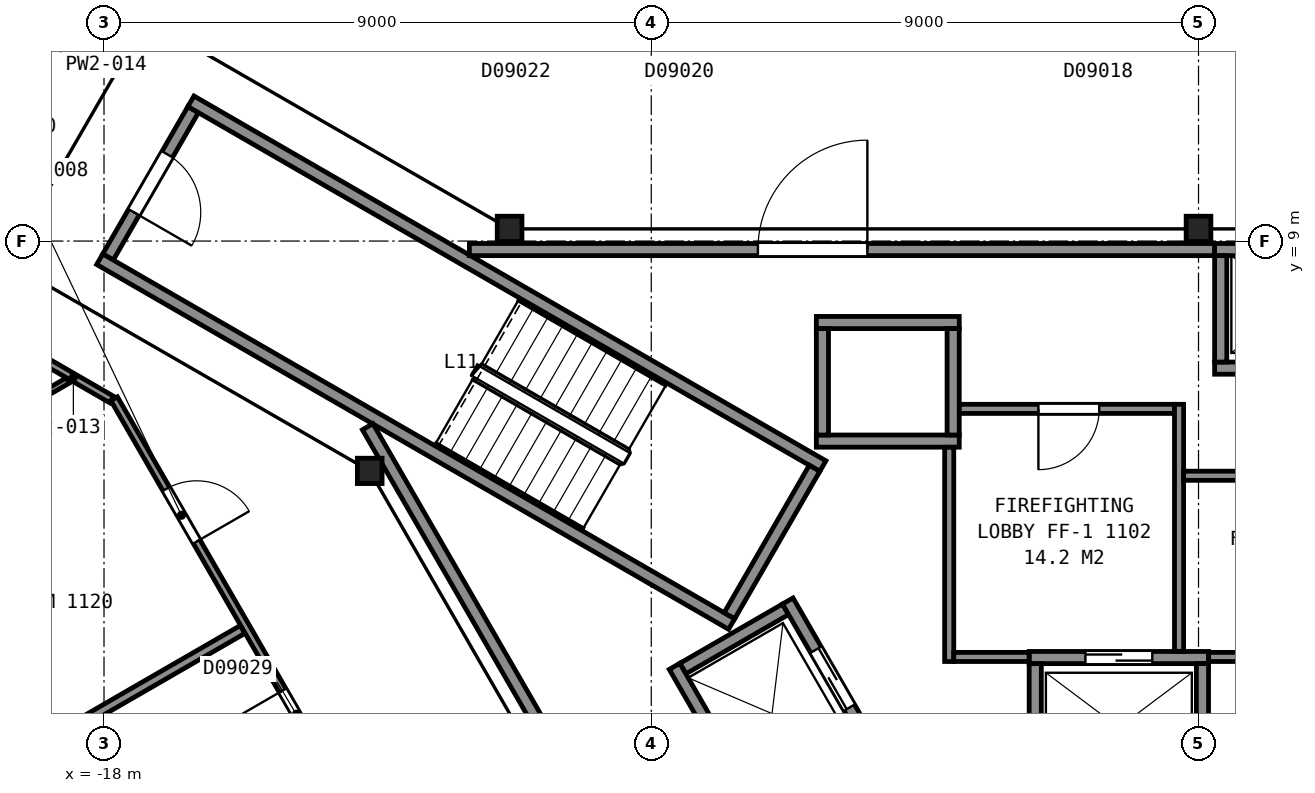
"""IFC4 building model, lengths in metres.
Left out: names, types, materials, properties, quantities, classifications, styles, units other than length and angle.
Written with IfcOpenShell. Run it as: python <this file> out.ifc"""

import sys

from ifc_helpers import new_model, si_unit, direction, frame, frame_2d, origin, origin_2d, place, context, subcontext, project, spatial, rectangle, i_section, extrude, element, fill, save


model = new_model("IFC4")
c1 = context("Model", 3, precision=1e-05, world=origin(), true_north=direction((0.0, 1.0)))
c2 = subcontext(c1, "Body", "Model", "MODEL_VIEW")
j1 = project(units=[si_unit("LENGTHUNIT", "METRE"), si_unit("PLANEANGLEUNIT", "RADIAN")], contexts=[c1])
p1 = place(None, origin())
s1 = spatial("IfcSite", under=j1, at=p1, CompositionType="ELEMENT")
p2 = place(p1, origin())
s2 = spatial("IfcBuilding", under=s1, at=p2, CompositionType="ELEMENT")
p3 = place(p2, frame((0.0, 0.0, 54.8)))
s3 = spatial("IfcBuildingStorey", under=s2, at=p3, CompositionType="ELEMENT", Elevation=54.8)
for number, where, z_axis, x_axis in (
    (1, (0.0, 9.2, 0.0), (0.0, 0.0, 1.0), (1.0, 0.0, 0.0)),
    (2, (-11.33, 9.2, 0.0), (0.0, 0.0, 1.0), (1.0, 0.0, 0.0)),
    (3, (-13.63, 5.22, 0.0), (0.0, 0.0, 1.0), (1.0, 0.0, 0.0)),
):
    element("IfcColumn", number, at=place(p3, frame(where, z_axis=z_axis, x_axis=x_axis)), inside=s3, PredefinedType="COLUMN", context=c2, shape_type="SweptSolid", body=[
        extrude(i_section(OverallWidth=0.406, OverallDepth=0.417, WebThickness=0.03, FlangeThickness=0.048, FilletRadius=0.015, at=origin_2d()), origin(), (0.0, 0.0, 1.0), 3.6),
    ])
p4 = place(p3, frame((-16.534, 11.162, 0.0), z_axis=(0.0, 0.0, 1.0), x_axis=(-0.49998411664, -0.866034573852, 0.0)))
e4 = element("IfcWall", 4, at=p4, inside=s3, PredefinedType="PARTITIONING", context=c2, shape_type="SweptSolid", body=[
    extrude(rectangle(XDim=2.8, YDim=0.2, at=frame_2d((1.4, 0.0))), origin(), (0.0, 0.0, 1.0), 3.35),
])
p5 = place(p4, frame((0.85, 0.0, 0.0)))
e5 = element("IfcOpeningElement", 5, at=p5, cuts=e4, PredefinedType="OPENING", context=c2, shape_type="SweptSolid", body=[
    extrude(rectangle(XDim=1.1, YDim=2.1, at=frame_2d((0.55, 1.05))), frame((0.0, 0.11, 0.0), z_axis=(0.0, -1.0, 0.0), x_axis=(1.0, 0.0, 0.0)), (0.0, 0.0, 1.0), 0.22),
])
for number, where, z_axis, x_axis in (
    (6, (-7.678, 2.701, 0.0), (0.0, 0.0, 1.0), (-0.866, 0.5, 0.0)),
    (7, (-6.178, 5.299, 0.0), (0.0, 0.0, 1.0), (-0.866, 0.5, 0.0)),
):
    element("IfcWall", number, at=place(p3, frame(where, z_axis=z_axis, x_axis=x_axis)), inside=s3, PredefinedType="PARTITIONING", context=c2, shape_type="SweptSolid", body=[
        extrude(rectangle(XDim=12.0, YDim=0.2, at=frame_2d((6.0, 0.0))), origin(), (0.0, 0.0, 1.0), 3.35),
    ])
p6 = place(p3, frame((-6.315, 5.262, 0.0), z_axis=(0.0, 0.0, 1.0), x_axis=(-0.500049511043, -0.865996816683, 0.0)))
e8 = element("IfcWall", 8, at=p6, inside=s3, PredefinedType="PARTITIONING", context=c2, shape_type="SweptSolid", body=[
    extrude(rectangle(XDim=2.8, YDim=0.2, at=frame_2d((1.4, 0.0))), origin(), (0.0, 0.0, 1.0), 3.35),
])
p7 = place(p3, frame((-2.785, 2.15, 0.0), z_axis=(0.0, 0.0, 1.0), x_axis=(1.0, 0.0, 0.0)))
e9 = element("IfcWall", 9, at=p7, inside=s3, PredefinedType="PARTITIONING", context=c2, shape_type="SweptSolid", body=[
    extrude(rectangle(XDim=2.95, YDim=0.2, at=frame_2d((1.475, 0.0))), origin(), (0.0, 0.0, 1.0), 3.6),
])
p8 = place(p7, frame((0.925, 0.0, 0.0)))
e10 = element("IfcOpeningElement", 10, at=p8, cuts=e9, PredefinedType="OPENING", context=c2, shape_type="SweptSolid", body=[
    extrude(rectangle(XDim=1.1, YDim=2.1, at=frame_2d((0.55, 1.05))), frame((0.0, 0.11, 0.0), z_axis=(0.0, -1.0, 0.0), x_axis=(1.0, 0.0, 0.0)), (0.0, 0.0, 1.0), 0.22),
])
p9 = place(p3, frame((-6.285, 5.71, 0.0), z_axis=(0.0, 0.0, 1.0), x_axis=(1.0, 0.0, 0.0)))
e11 = element("IfcWall", 11, at=p9, inside=s3, PredefinedType="PARTITIONING", context=c2, shape_type="SweptSolid", body=[
    extrude(rectangle(XDim=2.35, YDim=0.2, at=frame_2d((1.175, 0.0))), origin(), (0.0, 0.0, 1.0), 3.6),
])
p10 = place(p3, frame((0.265, 6.91, 0.0), z_axis=(0.0, 0.0, 1.0), x_axis=(1.0, 0.0, 0.0)))
e12 = element("IfcWall", 12, at=p10, inside=s3, PredefinedType="PARTITIONING", context=c2, shape_type="SweptSolid", body=[
    extrude(rectangle(XDim=2.55, YDim=0.2, at=frame_2d((1.275, 0.0))), origin(), (0.0, 0.0, 1.0), 3.6),
])
p11 = place(p10, frame((0.725, 0.0, 0.0)))
e13 = element("IfcOpeningElement", 13, at=p11, cuts=e12, PredefinedType="OPENING", context=c2, shape_type="SweptSolid", body=[
    extrude(rectangle(XDim=1.1, YDim=2.1, at=frame_2d((0.55, 1.05))), frame((0.0, 0.11, 0.0), z_axis=(0.0, -1.0, 0.0), x_axis=(1.0, 0.0, 0.0)), (0.0, 0.0, 1.0), 0.22),
])
p12 = place(p3, frame((-6.285, 7.66, 0.0), z_axis=(0.0, 0.0, 1.0), x_axis=(1.0, 0.0, 0.0)))
e14 = element("IfcWall", 14, at=p12, inside=s3, PredefinedType="PARTITIONING", context=c2, shape_type="SweptSolid", body=[
    extrude(rectangle(XDim=2.35, YDim=0.2, at=frame_2d((1.175, 0.0))), origin(), (0.0, 0.0, 1.0), 3.6),
])
p13 = place(p3, frame((0.265, 8.86, 0.0), z_axis=(0.0, 0.0, 1.0), x_axis=(1.0, 0.0, 0.0)))
e15 = element("IfcWall", 15, at=p13, inside=s3, PredefinedType="PARTITIONING", context=c2, shape_type="SweptSolid", body=[
    extrude(rectangle(XDim=2.55, YDim=0.2, at=frame_2d((1.275, 0.0))), origin(), (0.0, 0.0, 1.0), 3.6),
])
p14 = place(p3, frame((-8.48, 1.969, 0.0), z_axis=(0.0, 0.0, 1.0), x_axis=(0.866000020948, 0.500043961785, 0.0)))
e16 = element("IfcWall", 16, at=p14, inside=s3, PredefinedType="PARTITIONING", context=c2, shape_type="SweptSolid", body=[
    extrude(rectangle(XDim=1.95, YDim=0.2, at=frame_2d((0.975, 0.0))), origin(), (0.0, 0.0, 1.0), 3.6),
])
p15 = place(p3, frame((0.365, 7.01, 0.0), z_axis=(0.0, 0.0, 1.0), x_axis=(0.0, 1.0, 0.0)))
e17 = element("IfcWall", 17, at=p15, inside=s3, PredefinedType="PARTITIONING", context=c2, shape_type="SweptSolid", body=[
    extrude(rectangle(XDim=1.75, YDim=0.2, at=frame_2d((0.875, 0.0))), origin(), (0.0, 0.0, 1.0), 3.6),
])
for number, where, z_axis, x_axis in (
    (18, (0.065, 0.1, 0.0), (0.0, 0.0, 1.0), (0.0, 1.0, 0.0)),
    (19, (-2.685, 0.1, 0.0), (0.0, 0.0, 1.0), (0.0, 1.0, 0.0)),
):
    element("IfcWall", number, at=place(p3, frame(where, z_axis=z_axis, x_axis=x_axis)), inside=s3, PredefinedType="PARTITIONING", context=c2, shape_type="SweptSolid", body=[
        extrude(rectangle(XDim=1.95, YDim=0.2, at=frame_2d((0.975, 0.0))), origin(), (0.0, 0.0, 1.0), 3.6),
    ])
for number, where, z_axis, x_axis in (
    (20, (-4.035, 5.81, 0.0), (0.0, 0.0, 1.0), (0.0, 1.0, 0.0)),
    (21, (-6.185, 5.81, 0.0), (0.0, 0.0, 1.0), (0.0, 1.0, 0.0)),
):
    element("IfcWall", number, at=place(p3, frame(where, z_axis=z_axis, x_axis=x_axis)), inside=s3, PredefinedType="PARTITIONING", context=c2, shape_type="SweptSolid", body=[
        extrude(rectangle(XDim=1.75, YDim=0.2, at=frame_2d((0.875, 0.0))), origin(), (0.0, 0.0, 1.0), 3.6),
    ])
p16 = place(p3, frame((-5.28, 0.525, 0.0), z_axis=(0.0, 0.0, 1.0), x_axis=(-0.500037662692, 0.866003658127, 0.0)))
e22 = element("IfcWall", 22, at=p16, inside=s3, PredefinedType="PARTITIONING", context=c2, shape_type="SweptSolid", body=[
    extrude(rectangle(XDim=2.95, YDim=0.2, at=frame_2d((1.475, 0.0))), origin(), (0.0, 0.0, 1.0), 3.6),
])
p17 = place(p16, frame((0.925, 0.0, 0.0)))
e23 = element("IfcOpeningElement", 23, at=p17, cuts=e22, PredefinedType="OPENING", context=c2, shape_type="SweptSolid", body=[
    extrude(rectangle(XDim=1.1, YDim=2.1, at=frame_2d((0.55, 1.05))), frame((0.0, 0.11, 0.0), z_axis=(0.0, -1.0, 0.0), x_axis=(1.0, 0.0, 0.0)), (0.0, 0.0, 1.0), 0.22),
])
p18 = place(p3, frame((-7.242, -0.376, 0.0), z_axis=(0.0, 0.0, 1.0), x_axis=(-0.499996545922, 0.866027397988, 0.0)))
e24 = element("IfcWall", 24, at=p18, inside=s3, PredefinedType="PARTITIONING", context=c2, shape_type="SweptSolid", body=[
    extrude(rectangle(XDim=2.75, YDim=0.2, at=frame_2d((1.375, 0.0))), origin(), (0.0, 0.0, 1.0), 3.6),
])
p19 = place(p3, frame((-13.664, 5.946, 0.0), z_axis=(0.0, 0.0, 1.0), x_axis=(0.499994327219, -0.866028678941, 0.0)))
e25 = element("IfcWall", 25, at=p19, inside=s3, PredefinedType="PARTITIONING", context=c2, shape_type="SweptSolid", body=[
    extrude(rectangle(XDim=23.968, YDim=0.2, at=frame_2d((11.984, 0.0))), origin(), (0.0, 0.0, 1.0), 3.35),
])
p20 = place(p3, frame((0.263, 8.86, 0.0), z_axis=(0.0, 0.0, 1.0), x_axis=(-1.0, 0.0, 0.0)))
e26 = element("IfcWall", 26, at=p20, inside=s3, PredefinedType="PARTITIONING", context=c2, shape_type="SweptSolid", body=[
    extrude(rectangle(XDim=12.254, YDim=0.2, at=frame_2d((6.127, 0.0))), origin(), (0.0, 0.0, 1.0), 3.35),
])
p21 = place(p20, frame((5.709, 0.0, 0.0)))
e27 = element("IfcOpeningElement", 27, at=p21, cuts=e26, PredefinedType="OPENING", context=c2, shape_type="SweptSolid", body=[
    extrude(rectangle(XDim=1.8, YDim=2.1, at=frame_2d((0.9, 1.05))), frame((0.0, 0.11, 0.0), z_axis=(0.0, -1.0, 0.0), x_axis=(1.0, 0.0, 0.0)), (0.0, 0.0, 1.0), 0.22),
])
p22 = place(p3, frame((-4.1, 2.085, 0.0), z_axis=(0.0, 0.0, 1.0), x_axis=(0.0, 1.0, 0.0)))
e28 = element("IfcWall", 28, at=p22, inside=s3, PredefinedType="PARTITIONING", context=c2, shape_type="SweptSolid", body=[
    extrude(rectangle(XDim=3.523, YDim=0.15, at=frame_2d((1.761, 0.0))), origin(), (0.0, 0.0, 1.0), 3.35),
])
p23 = place(p3, frame((-4.025, 2.16, 0.0), z_axis=(0.0, 0.0, 1.0), x_axis=(1.0, 0.0, 0.0)))
e29 = element("IfcWall", 29, at=p23, inside=s3, PredefinedType="PARTITIONING", context=c2, shape_type="SweptSolid", body=[
    extrude(rectangle(XDim=1.238, YDim=0.15, at=frame_2d((0.619, 0.0))), origin(), (0.0, 0.0, 1.0), 3.35),
])
p24 = place(p3, frame((-3.933, 6.24, 0.0), z_axis=(0.0, 0.0, 1.0), x_axis=(1.0, 0.0, 0.0)))
e30 = element("IfcWall", 30, at=p24, inside=s3, PredefinedType="PARTITIONING", context=c2, shape_type="SweptSolid", body=[
    extrude(rectangle(XDim=3.538, YDim=0.15, at=frame_2d((1.769, 0.0))), origin(), (0.0, 0.0, 1.0), 3.35),
])
p25 = place(p24, frame((1.3, 0.0, 0.0)))
e31 = element("IfcOpeningElement", 31, at=p25, cuts=e30, PredefinedType="OPENING", context=c2, shape_type="SweptSolid", body=[
    extrude(rectangle(XDim=1.0, YDim=2.1, at=frame_2d((0.5, 1.05))), frame((0.0, 0.085, 0.0), z_axis=(0.0, -1.0, 0.0), x_axis=(1.0, 0.0, 0.0)), (0.0, 0.0, 1.0), 0.17),
])
p26 = place(p3, frame((-0.32, 2.252, 0.0), z_axis=(0.0, 0.0, 1.0), x_axis=(0.0, 1.0, 0.0)))
e32 = element("IfcWall", 32, at=p26, inside=s3, PredefinedType="PARTITIONING", context=c2, shape_type="SweptSolid", body=[
    extrude(rectangle(XDim=4.063, YDim=0.15, at=frame_2d((2.031, 0.0))), origin(), (0.0, 0.0, 1.0), 3.35),
])
p27 = place(p3, frame((-0.245, 5.14, 0.0), z_axis=(0.0, 0.0, 1.0), x_axis=(1.0, 0.0, 0.0)))
e33 = element("IfcWall", 33, at=p27, inside=s3, PredefinedType="PARTITIONING", context=c2, shape_type="SweptSolid", body=[
    extrude(rectangle(XDim=5.11, YDim=0.15, at=frame_2d((2.555, 0.0))), origin(), (0.0, 0.0, 1.0), 3.35),
])
p28 = place(p27, frame((1.975, 0.0, 0.0)))
e34 = element("IfcOpeningElement", 34, at=p28, cuts=e33, PredefinedType="OPENING", context=c2, shape_type="SweptSolid", body=[
    extrude(rectangle(XDim=1.0, YDim=2.1, at=frame_2d((0.5, 1.05))), frame((0.0, 0.085, 0.0), z_axis=(0.0, -1.0, 0.0), x_axis=(1.0, 0.0, 0.0)), (0.0, 0.0, 1.0), 0.17),
])
p29 = place(p3, frame((0.167, 2.16, 0.0), z_axis=(0.0, 0.0, 1.0), x_axis=(1.0, 0.0, 0.0)))
e35 = element("IfcWall", 35, at=p29, inside=s3, PredefinedType="PARTITIONING", context=c2, shape_type="SweptSolid", body=[
    extrude(rectangle(XDim=1.356, YDim=0.15, at=frame_2d((0.678, 0.0))), origin(), (0.0, 0.0, 1.0), 3.35),
])
p30 = place(p3, frame((-25.476, 2.735, 0.0), z_axis=(0.0, 0.0, 1.0), x_axis=(0.866077639848, 0.499909513568, 0.0)))
e36 = element("IfcWall", 36, at=p30, inside=s3, PredefinedType="PARTITIONING", context=c2, shape_type="SweptSolid", body=[
    extrude(rectangle(XDim=7.946, YDim=0.1, at=frame_2d((3.973, 0.0))), origin(), (0.0, 0.0, 1.0), 2.613),
])
p31 = place(p30, frame((3.604, 0.0, 0.0)))
e37 = element("IfcOpeningElement", 37, at=p31, cuts=e36, PredefinedType="OPENING", context=c2, shape_type="SweptSolid", body=[
    extrude(rectangle(XDim=0.9, YDim=2.1, at=frame_2d((0.45, 1.05))), frame((0.0, 0.06, 0.0), z_axis=(0.0, -1.0, 0.0), x_axis=(1.0, 0.0, 0.0)), (0.0, 0.0, 1.0), 0.12),
])
p32 = place(p3, frame((-22.984, -1.581, 0.0), z_axis=(0.0, 0.0, 1.0), x_axis=(0.866040157966, 0.499974444137, 0.0)))
e38 = element("IfcWall", 38, at=p32, inside=s3, PredefinedType="PARTITIONING", context=c2, shape_type="SweptSolid", body=[
    extrude(rectangle(XDim=8.387, YDim=0.15, at=frame_2d((4.193, 0.0))), origin(), (0.0, 0.0, 1.0), 2.613),
])
p33 = place(p3, frame((-19.132, 7.121, 0.0), z_axis=(0.0, 0.0, 1.0), x_axis=(0.865894215669, -0.500227155672, 0.0)))
e39 = element("IfcWall", 39, at=p33, inside=s3, PredefinedType="PARTITIONING", context=c2, shape_type="SweptSolid", body=[
    extrude(rectangle(XDim=1.451, YDim=0.125, at=frame_2d((0.726, 0.0))), origin(), (0.0, 0.0, 1.0), 2.613),
])
p34 = place(p3, frame((-3.766, -17.959, 0.0), z_axis=(0.0, 0.0, 1.0), x_axis=(-0.500002884005, 0.866023738697, 0.0)))
e40 = element("IfcWall", 40, at=p34, inside=s3, PredefinedType="PARTITIONING", context=c2, shape_type="SweptSolid", body=[
    extrude(rectangle(XDim=28.135, YDim=0.125, at=frame_2d((14.067, 0.0))), origin(), (0.0, 0.0, 1.0), 2.613),
])
p35 = place(p34, frame((25.422, 0.0, 0.0)))
e41 = element("IfcOpeningElement", 41, at=p35, cuts=e40, PredefinedType="OPENING", context=c2, shape_type="SweptSolid", body=[
    extrude(rectangle(XDim=1.0, YDim=2.1, at=frame_2d((0.5, 1.05))), frame((0.0, 0.073, 0.0), z_axis=(0.0, -1.0, 0.0), x_axis=(1.0, 0.0, 0.0)), (0.0, 0.0, 1.0), 0.145),
])
p36 = place(p34, frame((21.693, 0.0, 0.0)))
e42 = element("IfcOpeningElement", 42, at=p36, cuts=e40, PredefinedType="OPENING", context=c2, shape_type="SweptSolid", body=[
    extrude(rectangle(XDim=0.9, YDim=2.1, at=frame_2d((0.45, 1.05))), frame((0.0, 0.073, 0.0), z_axis=(0.0, -1.0, 0.0), x_axis=(1.0, 0.0, 0.0)), (0.0, 0.0, 1.0), 0.145),
])
p37 = place(p34, frame((14.438, 0.0, 0.0)))
e43 = element("IfcOpeningElement", 43, at=p37, cuts=e40, PredefinedType="OPENING", context=c2, shape_type="SweptSolid", body=[
    extrude(rectangle(XDim=0.9, YDim=2.1, at=frame_2d((0.45, 1.05))), frame((0.0, 0.073, 0.0), z_axis=(0.0, -1.0, 0.0), x_axis=(1.0, 0.0, 0.0)), (0.0, 0.0, 1.0), 0.145),
])
p38 = place(p34, frame((11.712, 0.0, 0.0)))
e44 = element("IfcOpeningElement", 44, at=p38, cuts=e40, PredefinedType="OPENING", context=c2, shape_type="SweptSolid", body=[
    extrude(rectangle(XDim=0.9, YDim=2.1, at=frame_2d((0.45, 1.05))), frame((0.0, 0.073, 0.0), z_axis=(0.0, -1.0, 0.0), x_axis=(1.0, 0.0, 0.0)), (0.0, 0.0, 1.0), 0.145),
])
p39 = place(p34, frame((4.787, 0.0, 0.0)))
e45 = element("IfcOpeningElement", 45, at=p39, cuts=e40, PredefinedType="OPENING", context=c2, shape_type="SweptSolid", body=[
    extrude(rectangle(XDim=0.9, YDim=2.1, at=frame_2d((0.45, 1.05))), frame((0.0, 0.073, 0.0), z_axis=(0.0, -1.0, 0.0), x_axis=(1.0, 0.0, 0.0)), (0.0, 0.0, 1.0), 0.145),
])
p40 = place(p34, frame((1.762, 0.0, 0.0)))
e46 = element("IfcOpeningElement", 46, at=p40, cuts=e40, PredefinedType="OPENING", context=c2, shape_type="SweptSolid", body=[
    extrude(rectangle(XDim=0.9, YDim=2.1, at=frame_2d((0.45, 1.05))), frame((0.0, 0.073, 0.0), z_axis=(0.0, -1.0, 0.0), x_axis=(1.0, 0.0, 0.0)), (0.0, 0.0, 1.0), 0.145),
])
p41 = place(p5, origin())
e47 = element("IfcDoor", 47, at=p41, inside=s3, OperationType="SINGLE_SWING_RIGHT", PredefinedType="DOOR", context=c2, shape_type="SweptSolid", body=[
    extrude(rectangle(XDim=1.1, YDim=2.1, at=frame_2d((0.55, 1.05))), frame((0.0, 0.025, 0.0), z_axis=(0.0, -1.0, 0.0), x_axis=(1.0, 0.0, 0.0)), (0.0, 0.0, 1.0), 0.05),
])
fill(e5, e47)
p42 = place(p8, origin())
e48 = element("IfcDoor", 48, at=p42, inside=s3, OperationType="SLIDING_TO_LEFT", PredefinedType="DOOR", context=c2, shape_type="SweptSolid", body=[
    extrude(rectangle(XDim=1.1, YDim=2.1, at=frame_2d((0.55, 1.05))), frame((0.0, 0.025, 0.0), z_axis=(0.0, -1.0, 0.0), x_axis=(1.0, 0.0, 0.0)), (0.0, 0.0, 1.0), 0.05),
])
fill(e10, e48)
p43 = place(p17, origin())
e49 = element("IfcDoor", 49, at=p43, inside=s3, OperationType="SLIDING_TO_LEFT", PredefinedType="DOOR", context=c2, shape_type="SweptSolid", body=[
    extrude(rectangle(XDim=1.1, YDim=2.1, at=frame_2d((0.55, 1.05))), frame((0.0, 0.025, 0.0), z_axis=(0.0, -1.0, 0.0), x_axis=(1.0, 0.0, 0.0)), (0.0, 0.0, 1.0), 0.05),
])
fill(e23, e49)
p44 = place(p21, origin())
e50 = element("IfcDoor", 50, at=p44, inside=s3, OperationType="DOUBLE_DOOR_SINGLE_SWING", PredefinedType="DOOR", context=c2, shape_type="SweptSolid", body=[
    extrude(rectangle(XDim=1.8, YDim=2.1, at=frame_2d((0.9, 1.05))), frame((0.0, 0.025, 0.0), z_axis=(0.0, -1.0, 0.0), x_axis=(1.0, 0.0, 0.0)), (0.0, 0.0, 1.0), 0.05),
])
fill(e27, e50)
p45 = place(p25, origin())
e51 = element("IfcDoor", 51, at=p45, inside=s3, OperationType="SINGLE_SWING_LEFT", PredefinedType="DOOR", context=c2, shape_type="SweptSolid", body=[
    extrude(rectangle(XDim=1.0, YDim=2.1, at=frame_2d((0.5, 1.05))), frame((0.0, 0.025, 0.0), z_axis=(0.0, -1.0, 0.0), x_axis=(1.0, 0.0, 0.0)), (0.0, 0.0, 1.0), 0.05),
])
fill(e31, e51)
p46 = place(p35, origin())
e52 = element("IfcDoor", 52, at=p46, inside=s3, OperationType="SINGLE_SWING_LEFT", PredefinedType="DOOR", context=c2, shape_type="SweptSolid", body=[
    extrude(rectangle(XDim=1.0, YDim=2.1, at=frame_2d((0.5, 1.05))), frame((0.0, 0.025, 0.0), z_axis=(0.0, -1.0, 0.0), x_axis=(1.0, 0.0, 0.0)), (0.0, 0.0, 1.0), 0.05),
])
fill(e41, e52)
p47 = place(p36, origin())
e53 = element("IfcDoor", 53, at=p47, inside=s3, OperationType="SINGLE_SWING_RIGHT", PredefinedType="DOOR", context=c2, shape_type="SweptSolid", body=[
    extrude(rectangle(XDim=0.9, YDim=2.1, at=frame_2d((0.45, 1.05))), frame((0.0, 0.025, 0.0), z_axis=(0.0, -1.0, 0.0), x_axis=(1.0, 0.0, 0.0)), (0.0, 0.0, 1.0), 0.05),
])
fill(e42, e53)
save(model, sys.argv[1])
